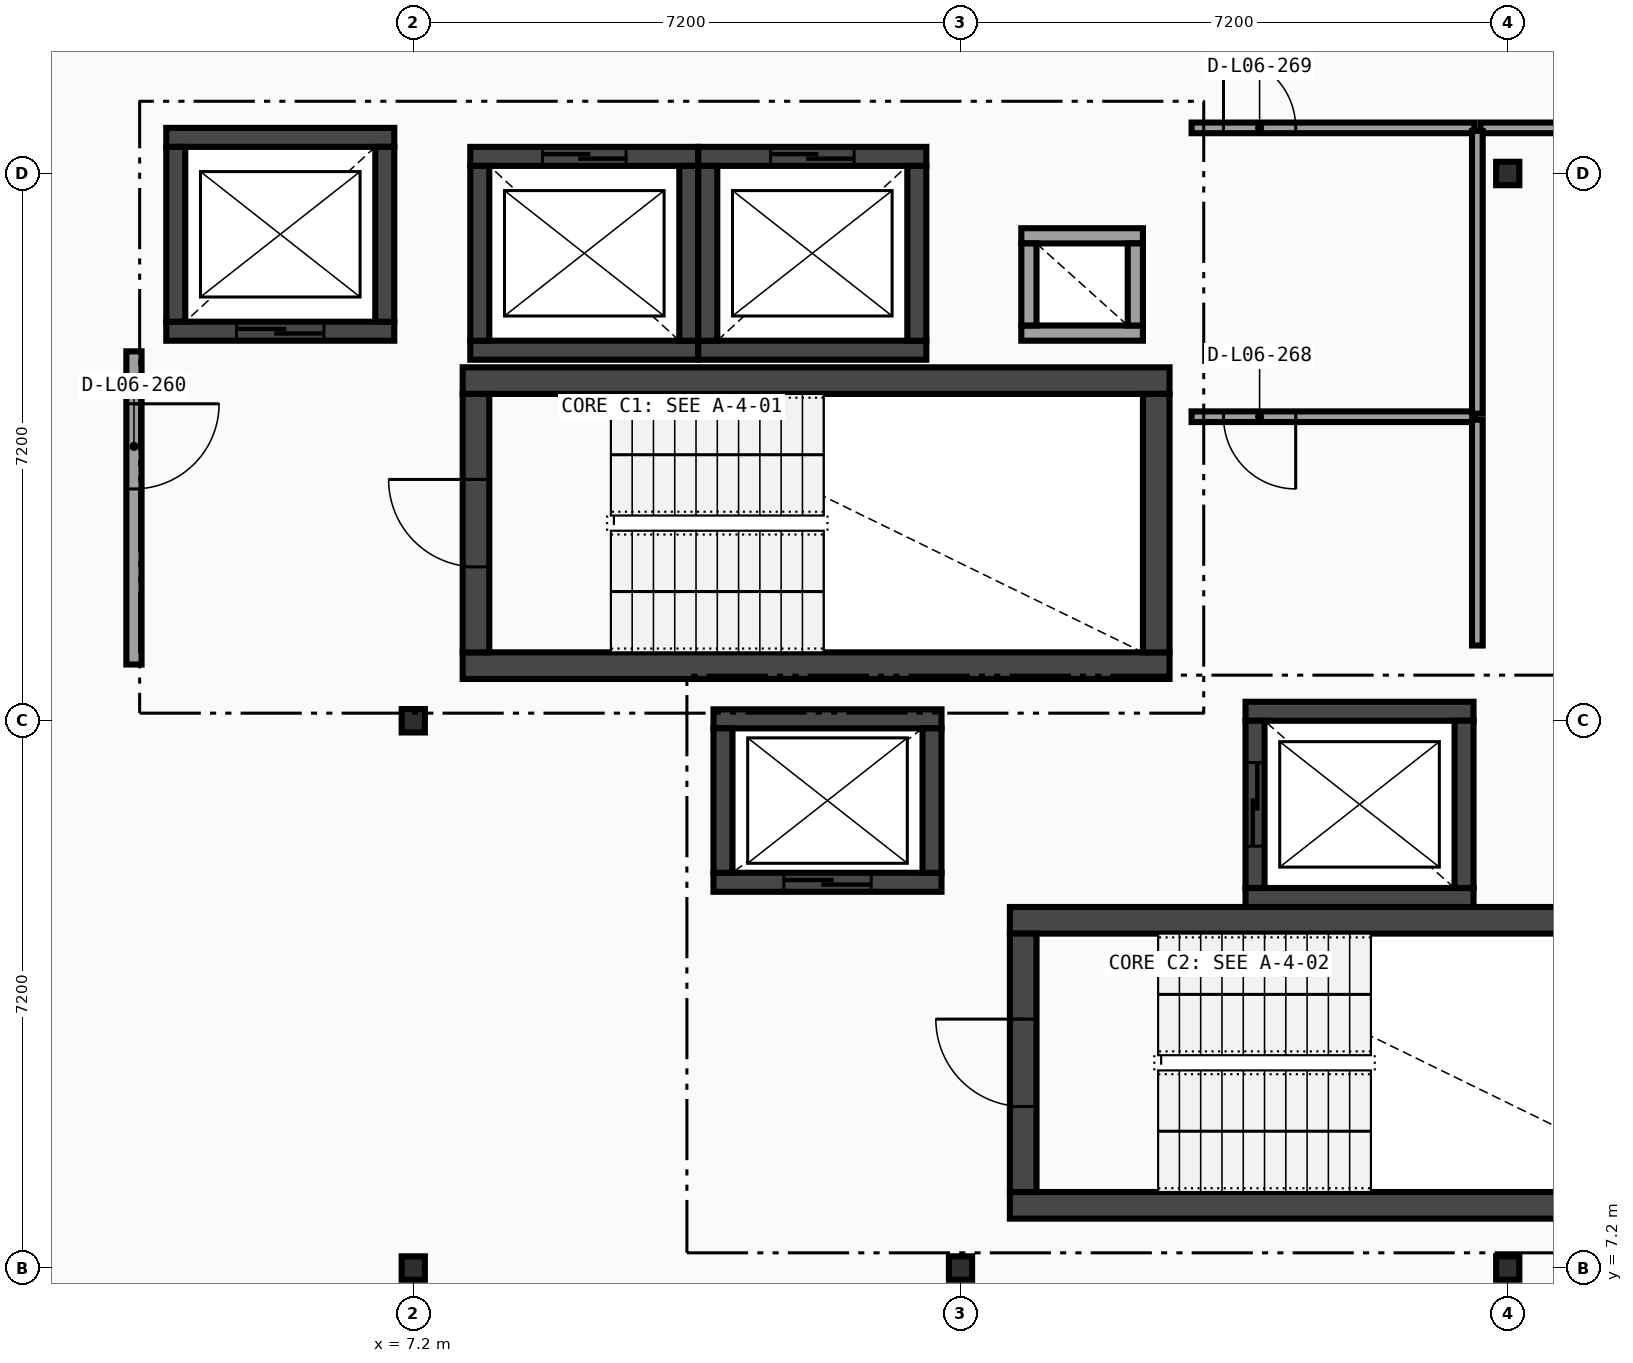
"""IFC4 building model, lengths in metres.
Left out: names, types, materials, properties, quantities, classifications, styles, units other than length and angle.
Written with IfcOpenShell. Run it as: python <this file> out.ifc"""

import sys

from ifc_helpers import new_model, si_unit, direction, frame, frame_2d, origin, origin_2d, place, context, subcontext, project, spatial, rectangle, i_section, extrude, element, fill, save


model = new_model("IFC4")
c1 = context("Model", 3, precision=1e-05, world=origin(), true_north=direction((0.0, 1.0)))
c2 = subcontext(c1, "Body", "Model", "MODEL_VIEW")
j1 = project(units=[si_unit("LENGTHUNIT", "METRE"), si_unit("PLANEANGLEUNIT", "RADIAN")], contexts=[c1])
p1 = place(None, origin())
s1 = spatial("IfcSite", under=j1, at=p1, CompositionType="ELEMENT")
p2 = place(p1, origin())
s2 = spatial("IfcBuilding", under=s1, at=p2, CompositionType="ELEMENT")
p3 = place(p2, frame((0.0, 0.0, 27.0)))
s3 = spatial("IfcBuildingStorey", under=s2, at=p3, CompositionType="ELEMENT", Elevation=27.0)
for number, where, z_axis, x_axis in (
    (1, (7.2, 7.2, 0.0), (0.0, 0.0, 1.0), (1.0, 0.0, 0.0)),
    (2, (7.2, 14.4, 0.0), (0.0, 0.0, 1.0), (1.0, 0.0, 0.0)),
    (3, (14.4, 7.2, 0.0), (0.0, 0.0, 1.0), (1.0, 0.0, 0.0)),
    (4, (21.6, 7.2, 0.0), (0.0, 0.0, 1.0), (1.0, 0.0, 0.0)),
    (5, (21.6, 21.6, 0.0), (0.0, 0.0, 1.0), (1.0, 0.0, 0.0)),
):
    element("IfcColumn", number, at=place(p3, frame(where, z_axis=z_axis, x_axis=x_axis)), inside=s3, PredefinedType="COLUMN", context=c2, shape_type="SweptSolid", body=[
        extrude(i_section(OverallWidth=0.305, OverallDepth=0.308, WebThickness=0.01, FlangeThickness=0.015, FilletRadius=0.015, at=origin_2d()), origin(), (0.0, 0.0, 1.0), 4.05),
    ])
for number, where, z_axis, x_axis in (
    (6, (7.85, 15.125, 0.0), (0.0, 0.0, 1.0), (1.0, 0.0, 0.0)),
    (7, (17.15, 18.875, 0.0), (0.0, 0.0, 1.0), (-1.0, 0.0, 0.0)),
):
    element("IfcWall", number, at=place(p3, frame(where, z_axis=z_axis, x_axis=x_axis)), inside=s3, PredefinedType="SHEAR", context=c2, shape_type="SweptSolid", body=[
        extrude(rectangle(XDim=9.3, YDim=0.35, at=frame_2d((4.65, 0.0))), origin(), (0.0, 0.0, 1.0), 3.8),
    ])
p4 = place(p3, frame((8.025, 18.7, 0.0), z_axis=(0.0, 0.0, 1.0), x_axis=(0.0, -1.0, 0.0)))
e8 = element("IfcWall", 8, at=p4, inside=s3, PredefinedType="SHEAR", context=c2, shape_type="SweptSolid", body=[
    extrude(rectangle(XDim=3.4, YDim=0.35, at=frame_2d((1.7, 0.0))), origin(), (0.0, 0.0, 1.0), 3.8),
])
p5 = place(p4, frame((1.125, 0.0, 0.0)))
e9 = element("IfcOpeningElement", 9, at=p5, cuts=e8, PredefinedType="OPENING", context=c2, shape_type="SweptSolid", body=[
    extrude(rectangle(XDim=1.15, YDim=2.1, at=frame_2d((0.575, 1.05))), frame((0.0, 0.185, 0.0), z_axis=(0.0, -1.0, 0.0), x_axis=(1.0, 0.0, 0.0)), (0.0, 0.0, 1.0), 0.37),
])
p6 = place(p3, frame((16.975, 15.3, 0.0), z_axis=(0.0, 0.0, 1.0), x_axis=(0.0, 1.0, 0.0)))
e10 = element("IfcWall", 10, at=p6, inside=s3, PredefinedType="SHEAR", context=c2, shape_type="SweptSolid", body=[
    extrude(rectangle(XDim=3.4, YDim=0.35, at=frame_2d((1.7, 0.0))), origin(), (0.0, 0.0, 1.0), 3.8),
])
p7 = place(p3, frame((3.95, 19.525, 0.0), z_axis=(0.0, 0.0, 1.0), x_axis=(1.0, 0.0, 0.0)))
e11 = element("IfcWall", 11, at=p7, inside=s3, PredefinedType="SHEAR", context=c2, shape_type="SweptSolid", body=[
    extrude(rectangle(XDim=3.0, YDim=0.25, at=frame_2d((1.5, 0.0))), origin(), (0.0, 0.0, 1.0), 3.8),
])
p8 = place(p7, frame((0.925, 0.0, 0.0)))
e12 = element("IfcOpeningElement", 12, at=p8, cuts=e11, PredefinedType="OPENING", context=c2, shape_type="SweptSolid", body=[
    extrude(rectangle(XDim=1.15, YDim=2.1, at=frame_2d((0.575, 1.05))), frame((0.0, 0.135, 0.0), z_axis=(0.0, -1.0, 0.0), x_axis=(1.0, 0.0, 0.0)), (0.0, 0.0, 1.0), 0.27),
])
p9 = place(p3, frame((6.95, 22.075, 0.0), z_axis=(0.0, 0.0, 1.0), x_axis=(-1.0, 0.0, 0.0)))
e13 = element("IfcWall", 13, at=p9, inside=s3, PredefinedType="SHEAR", context=c2, shape_type="SweptSolid", body=[
    extrude(rectangle(XDim=3.0, YDim=0.25, at=frame_2d((1.5, 0.0))), origin(), (0.0, 0.0, 1.0), 3.8),
])
for number, where, z_axis, x_axis in (
    (14, (4.075, 21.95, 0.0), (0.0, 0.0, 1.0), (0.0, -1.0, 0.0)),
    (15, (6.825, 19.65, 0.0), (0.0, 0.0, 1.0), (0.0, 1.0, 0.0)),
):
    element("IfcWall", number, at=place(p3, frame(where, z_axis=z_axis, x_axis=x_axis)), inside=s3, PredefinedType="SHEAR", context=c2, shape_type="SweptSolid", body=[
        extrude(rectangle(XDim=2.3, YDim=0.25, at=frame_2d((1.15, 0.0))), origin(), (0.0, 0.0, 1.0), 3.8),
    ])
p10 = place(p3, frame((7.95, 19.275, 0.0), z_axis=(0.0, 0.0, 1.0), x_axis=(1.0, 0.0, 0.0)))
e16 = element("IfcWall", 16, at=p10, inside=s3, PredefinedType="SHEAR", context=c2, shape_type="SweptSolid", body=[
    extrude(rectangle(XDim=3.0, YDim=0.25, at=frame_2d((1.5, 0.0))), origin(), (0.0, 0.0, 1.0), 3.8),
])
p11 = place(p3, frame((10.95, 21.825, 0.0), z_axis=(0.0, 0.0, 1.0), x_axis=(-1.0, 0.0, 0.0)))
e17 = element("IfcWall", 17, at=p11, inside=s3, PredefinedType="SHEAR", context=c2, shape_type="SweptSolid", body=[
    extrude(rectangle(XDim=3.0, YDim=0.25, at=frame_2d((1.5, 0.0))), origin(), (0.0, 0.0, 1.0), 3.8),
])
p12 = place(p11, frame((0.95, 0.0, 0.0)))
e18 = element("IfcOpeningElement", 18, at=p12, cuts=e17, PredefinedType="OPENING", context=c2, shape_type="SweptSolid", body=[
    extrude(rectangle(XDim=1.1, YDim=2.1, at=frame_2d((0.55, 1.05))), frame((0.0, 0.135, 0.0), z_axis=(0.0, -1.0, 0.0), x_axis=(1.0, 0.0, 0.0)), (0.0, 0.0, 1.0), 0.27),
])
for number, where, z_axis, x_axis in (
    (19, (8.075, 21.7, 0.0), (0.0, 0.0, 1.0), (0.0, -1.0, 0.0)),
    (20, (10.825, 19.4, 0.0), (0.0, 0.0, 1.0), (0.0, 1.0, 0.0)),
):
    element("IfcWall", number, at=place(p3, frame(where, z_axis=z_axis, x_axis=x_axis)), inside=s3, PredefinedType="SHEAR", context=c2, shape_type="SweptSolid", body=[
        extrude(rectangle(XDim=2.3, YDim=0.25, at=frame_2d((1.15, 0.0))), origin(), (0.0, 0.0, 1.0), 3.8),
    ])
p13 = place(p3, frame((10.95, 19.275, 0.0), z_axis=(0.0, 0.0, 1.0), x_axis=(1.0, 0.0, 0.0)))
e21 = element("IfcWall", 21, at=p13, inside=s3, PredefinedType="SHEAR", context=c2, shape_type="SweptSolid", body=[
    extrude(rectangle(XDim=3.0, YDim=0.25, at=frame_2d((1.5, 0.0))), origin(), (0.0, 0.0, 1.0), 3.8),
])
p14 = place(p3, frame((13.95, 21.825, 0.0), z_axis=(0.0, 0.0, 1.0), x_axis=(-1.0, 0.0, 0.0)))
e22 = element("IfcWall", 22, at=p14, inside=s3, PredefinedType="SHEAR", context=c2, shape_type="SweptSolid", body=[
    extrude(rectangle(XDim=3.0, YDim=0.25, at=frame_2d((1.5, 0.0))), origin(), (0.0, 0.0, 1.0), 3.8),
])
p15 = place(p14, frame((0.95, 0.0, 0.0)))
e23 = element("IfcOpeningElement", 23, at=p15, cuts=e22, PredefinedType="OPENING", context=c2, shape_type="SweptSolid", body=[
    extrude(rectangle(XDim=1.1, YDim=2.1, at=frame_2d((0.55, 1.05))), frame((0.0, 0.135, 0.0), z_axis=(0.0, -1.0, 0.0), x_axis=(1.0, 0.0, 0.0)), (0.0, 0.0, 1.0), 0.27),
])
for number, where, z_axis, x_axis in (
    (24, (11.075, 21.7, 0.0), (0.0, 0.0, 1.0), (0.0, -1.0, 0.0)),
    (25, (13.825, 19.4, 0.0), (0.0, 0.0, 1.0), (0.0, 1.0, 0.0)),
):
    element("IfcWall", number, at=place(p3, frame(where, z_axis=z_axis, x_axis=x_axis)), inside=s3, PredefinedType="SHEAR", context=c2, shape_type="SweptSolid", body=[
        extrude(rectangle(XDim=2.3, YDim=0.25, at=frame_2d((1.15, 0.0))), origin(), (0.0, 0.0, 1.0), 3.8),
    ])
for number, where, z_axis, x_axis in (
    (26, (15.05, 8.025, 0.0), (0.0, 0.0, 1.0), (1.0, 0.0, 0.0)),
    (27, (24.35, 11.775, 0.0), (0.0, 0.0, 1.0), (-1.0, 0.0, 0.0)),
):
    element("IfcWall", number, at=place(p3, frame(where, z_axis=z_axis, x_axis=x_axis)), inside=s3, PredefinedType="SHEAR", context=c2, shape_type="SweptSolid", body=[
        extrude(rectangle(XDim=9.3, YDim=0.35, at=frame_2d((4.65, 0.0))), origin(), (0.0, 0.0, 1.0), 3.8),
    ])
p16 = place(p3, frame((15.225, 11.6, 0.0), z_axis=(0.0, 0.0, 1.0), x_axis=(0.0, -1.0, 0.0)))
e28 = element("IfcWall", 28, at=p16, inside=s3, PredefinedType="SHEAR", context=c2, shape_type="SweptSolid", body=[
    extrude(rectangle(XDim=3.4, YDim=0.35, at=frame_2d((1.7, 0.0))), origin(), (0.0, 0.0, 1.0), 3.8),
])
p17 = place(p16, frame((1.125, 0.0, 0.0)))
e29 = element("IfcOpeningElement", 29, at=p17, cuts=e28, PredefinedType="OPENING", context=c2, shape_type="SweptSolid", body=[
    extrude(rectangle(XDim=1.15, YDim=2.1, at=frame_2d((0.575, 1.05))), frame((0.0, 0.185, 0.0), z_axis=(0.0, -1.0, 0.0), x_axis=(1.0, 0.0, 0.0)), (0.0, 0.0, 1.0), 0.37),
])
p18 = place(p3, frame((11.15, 12.275, 0.0), z_axis=(0.0, 0.0, 1.0), x_axis=(1.0, 0.0, 0.0)))
e30 = element("IfcWall", 30, at=p18, inside=s3, PredefinedType="SHEAR", context=c2, shape_type="SweptSolid", body=[
    extrude(rectangle(XDim=3.0, YDim=0.25, at=frame_2d((1.5, 0.0))), origin(), (0.0, 0.0, 1.0), 3.8),
])
p19 = place(p18, frame((0.925, 0.0, 0.0)))
e31 = element("IfcOpeningElement", 31, at=p19, cuts=e30, PredefinedType="OPENING", context=c2, shape_type="SweptSolid", body=[
    extrude(rectangle(XDim=1.15, YDim=2.1, at=frame_2d((0.575, 1.05))), frame((0.0, 0.135, 0.0), z_axis=(0.0, -1.0, 0.0), x_axis=(1.0, 0.0, 0.0)), (0.0, 0.0, 1.0), 0.27),
])
p20 = place(p3, frame((14.15, 14.425, 0.0), z_axis=(0.0, 0.0, 1.0), x_axis=(-1.0, 0.0, 0.0)))
e32 = element("IfcWall", 32, at=p20, inside=s3, PredefinedType="SHEAR", context=c2, shape_type="SweptSolid", body=[
    extrude(rectangle(XDim=3.0, YDim=0.25, at=frame_2d((1.5, 0.0))), origin(), (0.0, 0.0, 1.0), 3.8),
])
for number, where, z_axis, x_axis in (
    (33, (11.275, 14.3, 0.0), (0.0, 0.0, 1.0), (0.0, -1.0, 0.0)),
    (34, (14.025, 12.4, 0.0), (0.0, 0.0, 1.0), (0.0, 1.0, 0.0)),
):
    element("IfcWall", number, at=place(p3, frame(where, z_axis=z_axis, x_axis=x_axis)), inside=s3, PredefinedType="SHEAR", context=c2, shape_type="SweptSolid", body=[
        extrude(rectangle(XDim=1.9, YDim=0.25, at=frame_2d((0.95, 0.0))), origin(), (0.0, 0.0, 1.0), 3.8),
    ])
for number, where, z_axis, x_axis in (
    (35, (18.15, 12.075, 0.0), (0.0, 0.0, 1.0), (1.0, 0.0, 0.0)),
    (36, (21.15, 14.525, 0.0), (0.0, 0.0, 1.0), (-1.0, 0.0, 0.0)),
):
    element("IfcWall", number, at=place(p3, frame(where, z_axis=z_axis, x_axis=x_axis)), inside=s3, PredefinedType="SHEAR", context=c2, shape_type="SweptSolid", body=[
        extrude(rectangle(XDim=3.0, YDim=0.25, at=frame_2d((1.5, 0.0))), origin(), (0.0, 0.0, 1.0), 3.8),
    ])
p21 = place(p3, frame((18.275, 14.4, 0.0), z_axis=(0.0, 0.0, 1.0), x_axis=(0.0, -1.0, 0.0)))
e37 = element("IfcWall", 37, at=p21, inside=s3, PredefinedType="SHEAR", context=c2, shape_type="SweptSolid", body=[
    extrude(rectangle(XDim=2.2, YDim=0.25, at=frame_2d((1.1, 0.0))), origin(), (0.0, 0.0, 1.0), 3.8),
])
p22 = place(p21, frame((0.55, 0.0, 0.0)))
e38 = element("IfcOpeningElement", 38, at=p22, cuts=e37, PredefinedType="OPENING", context=c2, shape_type="SweptSolid", body=[
    extrude(rectangle(XDim=1.1, YDim=2.1, at=frame_2d((0.55, 1.05))), frame((0.0, 0.135, 0.0), z_axis=(0.0, -1.0, 0.0), x_axis=(1.0, 0.0, 0.0)), (0.0, 0.0, 1.0), 0.27),
])
p23 = place(p3, frame((21.025, 12.2, 0.0), z_axis=(0.0, 0.0, 1.0), x_axis=(0.0, 1.0, 0.0)))
e39 = element("IfcWall", 39, at=p23, inside=s3, PredefinedType="SHEAR", context=c2, shape_type="SweptSolid", body=[
    extrude(rectangle(XDim=2.2, YDim=0.25, at=frame_2d((1.1, 0.0))), origin(), (0.0, 0.0, 1.0), 3.8),
])
for number, where, z_axis, x_axis in (
    (40, (15.2, 19.5, 0.0), (0.0, 0.0, 1.0), (1.0, 0.0, 0.0)),
    (41, (16.8, 20.78, 0.0), (0.0, 0.0, 1.0), (-1.0, 0.0, 0.0)),
):
    element("IfcWall", number, at=place(p3, frame(where, z_axis=z_axis, x_axis=x_axis)), inside=s3, PredefinedType="SOLIDWALL", context=c2, shape_type="SweptSolid", body=[
        extrude(rectangle(XDim=1.6, YDim=0.2, at=frame_2d((0.8, 0.0))), origin(), (0.0, 0.0, 1.0), 3.8),
    ])
for number, where, z_axis, x_axis in (
    (42, (15.3, 20.68, 0.0), (0.0, 0.0, 1.0), (0.0, -1.0, 0.0)),
    (43, (16.7, 19.6, 0.0), (0.0, 0.0, 1.0), (0.0, 1.0, 0.0)),
):
    element("IfcWall", number, at=place(p3, frame(where, z_axis=z_axis, x_axis=x_axis)), inside=s3, PredefinedType="SOLIDWALL", context=c2, shape_type="SweptSolid", body=[
        extrude(rectangle(XDim=1.08, YDim=0.2, at=frame_2d((0.54, 0.0))), origin(), (0.0, 0.0, 1.0), 3.8),
    ])
p24 = place(p3, frame((3.525, 15.14, 0.0), z_axis=(0.0, 0.0, 1.0), x_axis=(0.0, 1.0, 0.0)))
e44 = element("IfcWall", 44, at=p24, inside=s3, PredefinedType="PARTITIONING", context=c2, shape_type="SweptSolid", body=[
    extrude(rectangle(XDim=4.12, YDim=0.2, at=frame_2d((2.06, 0.0))), origin(), (0.0, 0.0, 1.0), 3.8),
])
p25 = place(p24, frame((2.31, 0.0, 0.0)))
e45 = element("IfcOpeningElement", 45, at=p25, cuts=e44, PredefinedType="OPENING", context=c2, shape_type="SweptSolid", body=[
    extrude(rectangle(XDim=1.12, YDim=2.1, at=frame_2d((0.56, 1.05))), frame((0.0, 0.11, 0.0), z_axis=(0.0, -1.0, 0.0), x_axis=(1.0, 0.0, 0.0)), (0.0, 0.0, 1.0), 0.22),
])
p26 = place(p3, frame((17.44, 22.2, 0.0), z_axis=(0.0, 0.0, 1.0), x_axis=(1.0, 0.0, 0.0)))
e46 = element("IfcWall", 46, at=p26, inside=s3, PredefinedType="PARTITIONING", context=c2, shape_type="SweptSolid", body=[
    extrude(rectangle(XDim=3.72, YDim=0.14, at=frame_2d((1.86, 0.0))), origin(), (0.0, 0.0, 1.0), 3.8),
])
p27 = place(p26, frame((0.42, 0.0, 0.0)))
e47 = element("IfcOpeningElement", 47, at=p27, cuts=e46, PredefinedType="OPENING", context=c2, shape_type="SweptSolid", body=[
    extrude(rectangle(XDim=0.95, YDim=2.08, at=frame_2d((0.475, 1.04))), frame((0.0, 0.08, 0.0), z_axis=(0.0, -1.0, 0.0), x_axis=(1.0, 0.0, 0.0)), (0.0, 0.0, 1.0), 0.16),
])
p28 = place(p3, frame((21.24, 22.2, 0.0), z_axis=(0.0, 0.0, 1.0), x_axis=(1.0, 0.0, 0.0)))
e48 = element("IfcWall", 48, at=p28, inside=s3, PredefinedType="PARTITIONING", context=c2, shape_type="SweptSolid", body=[
    extrude(rectangle(XDim=3.12, YDim=0.14, at=frame_2d((1.56, 0.0))), origin(), (0.0, 0.0, 1.0), 3.246),
])
p29 = place(p28, frame((1.75, 0.0, 0.0)))
e49 = element("IfcOpeningElement", 49, at=p29, cuts=e48, PredefinedType="OPENING", context=c2, shape_type="SweptSolid", body=[
    extrude(rectangle(XDim=0.95, YDim=2.08, at=frame_2d((0.475, 1.04))), frame((0.0, 0.08, 0.0), z_axis=(0.0, -1.0, 0.0), x_axis=(1.0, 0.0, 0.0)), (0.0, 0.0, 1.0), 0.16),
])
p30 = place(p3, frame((17.44, 18.4, 0.0), z_axis=(0.0, 0.0, 1.0), x_axis=(1.0, 0.0, 0.0)))
e50 = element("IfcWall", 50, at=p30, inside=s3, PredefinedType="PARTITIONING", context=c2, shape_type="SweptSolid", body=[
    extrude(rectangle(XDim=3.72, YDim=0.14, at=frame_2d((1.86, 0.0))), origin(), (0.0, 0.0, 1.0), 3.8),
])
p31 = place(p30, frame((0.42, 0.0, 0.0)))
e51 = element("IfcOpeningElement", 51, at=p31, cuts=e50, PredefinedType="OPENING", context=c2, shape_type="SweptSolid", body=[
    extrude(rectangle(XDim=0.95, YDim=2.08, at=frame_2d((0.475, 1.04))), frame((0.0, 0.08, 0.0), z_axis=(0.0, -1.0, 0.0), x_axis=(1.0, 0.0, 0.0)), (0.0, 0.0, 1.0), 0.16),
])
p32 = place(p3, frame((21.2, 15.39, 0.0), z_axis=(0.0, 0.0, 1.0), x_axis=(0.0, 1.0, 0.0)))
e52 = element("IfcWall", 52, at=p32, inside=s3, PredefinedType="PARTITIONING", context=c2, shape_type="SweptSolid", body=[
    extrude(rectangle(XDim=2.97, YDim=0.14, at=frame_2d((1.485, 0.0))), origin(), (0.0, 0.0, 1.0), 3.8),
])
p33 = place(p3, frame((21.2, 18.44, 0.0), z_axis=(0.0, 0.0, 1.0), x_axis=(0.0, 1.0, 0.0)))
e53 = element("IfcWall", 53, at=p33, inside=s3, PredefinedType="PARTITIONING", context=c2, shape_type="SweptSolid", body=[
    extrude(rectangle(XDim=3.72, YDim=0.14, at=frame_2d((1.86, 0.0))), origin(), (0.0, 0.0, 1.0), 3.8),
])
p34 = place(p5, frame((1.15, 0.0, 0.0), z_axis=(0.0, 0.0, 1.0), x_axis=(-1.0, 0.0, 0.0)))
e54 = element("IfcDoor", 54, at=p34, inside=s3, OperationType="SINGLE_SWING_RIGHT", PredefinedType="DOOR", context=c2, shape_type="SweptSolid", body=[
    extrude(rectangle(XDim=1.15, YDim=2.1, at=frame_2d((0.575, 1.05))), frame((0.0, 0.025, 0.0), z_axis=(0.0, -1.0, 0.0), x_axis=(1.0, 0.0, 0.0)), (0.0, 0.0, 1.0), 0.05),
])
fill(e9, e54)
p35 = place(p8, origin())
e55 = element("IfcDoor", 55, at=p35, inside=s3, OperationType="SLIDING_TO_RIGHT", PredefinedType="DOOR", context=c2, shape_type="SweptSolid", body=[
    extrude(rectangle(XDim=1.15, YDim=2.1, at=frame_2d((0.575, 1.05))), frame((0.0, 0.025, 0.0), z_axis=(0.0, -1.0, 0.0), x_axis=(1.0, 0.0, 0.0)), (0.0, 0.0, 1.0), 0.05),
])
fill(e12, e55)
p36 = place(p12, origin())
e56 = element("IfcDoor", 56, at=p36, inside=s3, OperationType="SLIDING_TO_LEFT", PredefinedType="DOOR", context=c2, shape_type="SweptSolid", body=[
    extrude(rectangle(XDim=1.1, YDim=2.1, at=frame_2d((0.55, 1.05))), frame((0.0, 0.025, 0.0), z_axis=(0.0, -1.0, 0.0), x_axis=(1.0, 0.0, 0.0)), (0.0, 0.0, 1.0), 0.05),
])
fill(e18, e56)
p37 = place(p15, origin())
e57 = element("IfcDoor", 57, at=p37, inside=s3, OperationType="SLIDING_TO_LEFT", PredefinedType="DOOR", context=c2, shape_type="SweptSolid", body=[
    extrude(rectangle(XDim=1.1, YDim=2.1, at=frame_2d((0.55, 1.05))), frame((0.0, 0.025, 0.0), z_axis=(0.0, -1.0, 0.0), x_axis=(1.0, 0.0, 0.0)), (0.0, 0.0, 1.0), 0.05),
])
fill(e23, e57)
p38 = place(p17, frame((1.15, 0.0, 0.0), z_axis=(0.0, 0.0, 1.0), x_axis=(-1.0, 0.0, 0.0)))
e58 = element("IfcDoor", 58, at=p38, inside=s3, OperationType="SINGLE_SWING_RIGHT", PredefinedType="DOOR", context=c2, shape_type="SweptSolid", body=[
    extrude(rectangle(XDim=1.15, YDim=2.1, at=frame_2d((0.575, 1.05))), frame((0.0, 0.025, 0.0), z_axis=(0.0, -1.0, 0.0), x_axis=(1.0, 0.0, 0.0)), (0.0, 0.0, 1.0), 0.05),
])
fill(e29, e58)
p39 = place(p19, origin())
e59 = element("IfcDoor", 59, at=p39, inside=s3, OperationType="SLIDING_TO_RIGHT", PredefinedType="DOOR", context=c2, shape_type="SweptSolid", body=[
    extrude(rectangle(XDim=1.15, YDim=2.1, at=frame_2d((0.575, 1.05))), frame((0.0, 0.025, 0.0), z_axis=(0.0, -1.0, 0.0), x_axis=(1.0, 0.0, 0.0)), (0.0, 0.0, 1.0), 0.05),
])
fill(e31, e59)
p40 = place(p22, origin())
e60 = element("IfcDoor", 60, at=p40, inside=s3, OperationType="SLIDING_TO_LEFT", PredefinedType="DOOR", context=c2, shape_type="SweptSolid", body=[
    extrude(rectangle(XDim=1.1, YDim=2.1, at=frame_2d((0.55, 1.05))), frame((0.0, 0.025, 0.0), z_axis=(0.0, -1.0, 0.0), x_axis=(1.0, 0.0, 0.0)), (0.0, 0.0, 1.0), 0.05),
])
fill(e38, e60)
p41 = place(p25, origin())
e61 = element("IfcDoor", 61, at=p41, inside=s3, OperationType="SINGLE_SWING_RIGHT", PredefinedType="DOOR", context=c2, shape_type="SweptSolid", body=[
    extrude(rectangle(XDim=1.12, YDim=2.1, at=frame_2d((0.56, 1.05))), frame((0.0, 0.025, 0.0), z_axis=(0.0, -1.0, 0.0), x_axis=(1.0, 0.0, 0.0)), (0.0, 0.0, 1.0), 0.05),
])
fill(e45, e61)
p42 = place(p31, origin())
e62 = element("IfcDoor", 62, at=p42, inside=s3, OperationType="SINGLE_SWING_RIGHT", PredefinedType="DOOR", context=c2, shape_type="SweptSolid", body=[
    extrude(rectangle(XDim=0.95, YDim=2.08, at=frame_2d((0.475, 1.04))), frame((0.0, 0.025, 0.0), z_axis=(0.0, -1.0, 0.0), x_axis=(1.0, 0.0, 0.0)), (0.0, 0.0, 1.0), 0.05),
])
fill(e51, e62)
p43 = place(p27, origin())
e63 = element("IfcDoor", 63, at=p43, inside=s3, OperationType="SINGLE_SWING_LEFT", PredefinedType="DOOR", context=c2, shape_type="SweptSolid", body=[
    extrude(rectangle(XDim=0.95, YDim=2.08, at=frame_2d((0.475, 1.04))), frame((0.0, 0.025, 0.0), z_axis=(0.0, -1.0, 0.0), x_axis=(1.0, 0.0, 0.0)), (0.0, 0.0, 1.0), 0.05),
])
fill(e47, e63)
save(model, sys.argv[1])
